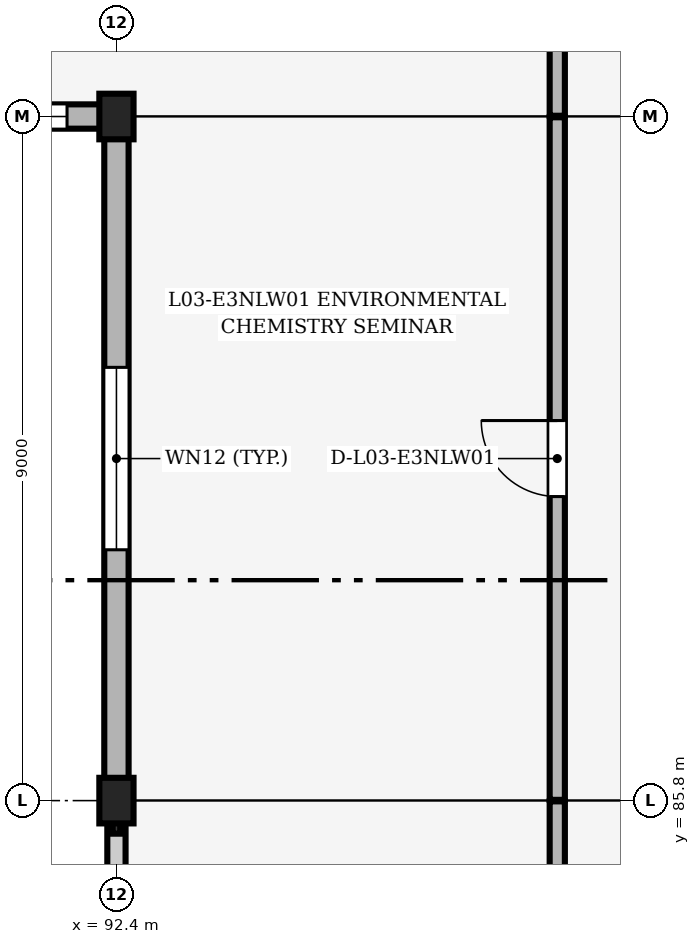
"""IFC4 building model, lengths in metres.
Left out: names, types, materials, properties, quantities, classifications, styles, units other than length and angle.
Written with IfcOpenShell. Run it as: python <this file> out.ifc"""

import sys

from ifc_helpers import new_model, si_unit, direction, frame, frame_2d, origin, origin_2d, place, context, subcontext, project, spatial, rectangle, extrude, element, fill, save


model = new_model("IFC4")
c1 = context("Model", 3, precision=1e-05, world=origin(), true_north=direction((0.0, 1.0)))
c2 = subcontext(c1, "Body", "Model", "MODEL_VIEW")
j1 = project(units=[si_unit("LENGTHUNIT", "METRE"), si_unit("PLANEANGLEUNIT", "RADIAN")], contexts=[c1])
p1 = place(None, origin())
s1 = spatial("IfcSite", under=j1, at=p1, CompositionType="ELEMENT")
p2 = place(p1, origin())
s2 = spatial("IfcBuilding", under=s1, at=p2, CompositionType="ELEMENT")
p3 = place(p2, frame((0.0, 0.0, 13.2)))
s3 = spatial("IfcBuildingStorey", under=s2, at=p3, CompositionType="ELEMENT", Elevation=13.2)
for number, where, z_axis, x_axis in (
    (1, (92.4, 85.8, 0.0), (0.0, 0.0, 1.0), (1.0, 0.0, 0.0)),
    (2, (92.4, 94.8, 0.0), (0.0, 0.0, 1.0), (1.0, 0.0, 0.0)),
):
    element("IfcColumn", number, at=place(p3, frame(where, z_axis=z_axis, x_axis=x_axis)), inside=s3, PredefinedType="COLUMN", context=c2, shape_type="SweptSolid", body=[
        extrude(rectangle(XDim=0.45, YDim=0.6, at=origin_2d()), origin(), (0.0, 0.0, 1.0), 4.2),
    ])
p4 = place(p3, frame((84.225, 94.8, 0.0), z_axis=(0.0, 0.0, 1.0), x_axis=(1.0, 0.0, 0.0)))
e3 = element("IfcWall", 3, at=p4, inside=s3, PredefinedType="SOLIDWALL", context=c2, shape_type="SweptSolid", body=[
    extrude(rectangle(XDim=7.975, YDim=0.32, at=frame_2d((3.987, 0.0))), origin(), (0.0, 0.0, 1.0), 3.48),
])
p5 = place(p4, frame((0.45, 0.0, 0.9)))
e4 = element("IfcOpeningElement", 4, at=p5, cuts=e3, PredefinedType="OPENING", context=c2, shape_type="SweptSolid", body=[
    extrude(rectangle(XDim=1.68, YDim=2.4, at=frame_2d((0.84, 1.2))), frame((0.0, 0.17, 0.0), z_axis=(0.0, -1.0, 0.0), x_axis=(1.0, 0.0, 0.0)), (0.0, 0.0, 1.0), 0.34),
])
p6 = place(p4, frame((6.325, 0.0, 0.9)))
e5 = element("IfcOpeningElement", 5, at=p6, cuts=e3, PredefinedType="OPENING", context=c2, shape_type="SweptSolid", body=[
    extrude(rectangle(XDim=1.2, YDim=1.5, at=frame_2d((0.6, 0.75))), frame((0.0, 0.17, 0.0), z_axis=(0.0, -1.0, 0.0), x_axis=(1.0, 0.0, 0.0)), (0.0, 0.0, 1.0), 0.34),
])
p7 = place(p3, frame((92.4, 86.075, 0.0), z_axis=(0.0, 0.0, 1.0), x_axis=(0.0, 1.0, 0.0)))
e6 = element("IfcWall", 6, at=p7, inside=s3, PredefinedType="SOLIDWALL", context=c2, shape_type="SweptSolid", body=[
    extrude(rectangle(XDim=8.45, YDim=0.32, at=frame_2d((4.225, 0.0))), origin(), (0.0, 0.0, 1.0), 3.48),
])
p8 = place(p7, frame((3.025, 0.0, 0.9)))
e7 = element("IfcOpeningElement", 7, at=p8, cuts=e6, PredefinedType="OPENING", context=c2, shape_type="SweptSolid", body=[
    extrude(rectangle(XDim=2.4, YDim=1.8, at=frame_2d((1.2, 0.9))), frame((0.0, 0.17, 0.0), z_axis=(0.0, -1.0, 0.0), x_axis=(1.0, 0.0, 0.0)), (0.0, 0.0, 1.0), 0.34),
])
p9 = place(p3, frame((92.4, 77.675, 0.0), z_axis=(0.0, 0.0, 1.0), x_axis=(0.0, 1.0, 0.0)))
e8 = element("IfcWall", 8, at=p9, inside=s3, PredefinedType="SOLIDWALL", context=c2, shape_type="SweptSolid", body=[
    extrude(rectangle(XDim=7.85, YDim=0.24, at=frame_2d((3.925, 0.0))), origin(), (0.0, 0.0, 1.0), 1.15),
])
p10 = place(p3, frame((98.2, 94.81, 0.0), z_axis=(0.0, 0.0, 1.0), x_axis=(0.0, 1.0, 0.0)))
e9 = element("IfcWall", 9, at=p10, inside=s3, PredefinedType="PARTITIONING", context=c2, shape_type="SweptSolid", body=[
    extrude(rectangle(XDim=6.085, YDim=0.2, at=frame_2d((3.042, 0.0))), origin(), (0.0, 0.0, 1.0), 3.9),
])
p11 = place(p3, frame((98.2, 85.81, 0.0), z_axis=(0.0, 0.0, 1.0), x_axis=(0.0, 1.0, 0.0)))
e10 = element("IfcWall", 10, at=p11, inside=s3, PredefinedType="PARTITIONING", context=c2, shape_type="SweptSolid", body=[
    extrude(rectangle(XDim=8.98, YDim=0.2, at=frame_2d((4.49, 0.0))), origin(), (0.0, 0.0, 1.0), 3.9),
])
p12 = place(p11, frame((3.99, 0.0, 0.0)))
e11 = element("IfcOpeningElement", 11, at=p12, cuts=e10, PredefinedType="OPENING", context=c2, shape_type="SweptSolid", body=[
    extrude(rectangle(XDim=1.0, YDim=2.15, at=frame_2d((0.5, 1.075))), frame((0.0, 0.11, 0.0), z_axis=(0.0, -1.0, 0.0), x_axis=(1.0, 0.0, 0.0)), (0.0, 0.0, 1.0), 0.22),
])
p13 = place(p3, frame((98.2, 35.565, 0.0), z_axis=(0.0, 0.0, 1.0), x_axis=(0.0, 1.0, 0.0)))
e12 = element("IfcWall", 12, at=p13, inside=s3, PredefinedType="PARTITIONING", context=c2, shape_type="SweptSolid", body=[
    extrude(rectangle(XDim=50.225, YDim=0.2, at=frame_2d((25.113, 0.0))), origin(), (0.0, 0.0, 1.0), 3.9),
])
p14 = place(p13, frame((5.035, 0.0, 0.0)))
e13 = element("IfcOpeningElement", 13, at=p14, cuts=e12, PredefinedType="OPENING", context=c2, shape_type="SweptSolid", body=[
    extrude(rectangle(XDim=1.0, YDim=2.15, at=frame_2d((0.5, 1.075))), frame((0.0, 0.11, 0.0), z_axis=(0.0, -1.0, 0.0), x_axis=(1.0, 0.0, 0.0)), (0.0, 0.0, 1.0), 0.22),
])
p15 = place(p13, frame((13.56, 0.0, 0.0)))
e14 = element("IfcOpeningElement", 14, at=p15, cuts=e12, PredefinedType="OPENING", context=c2, shape_type="SweptSolid", body=[
    extrude(rectangle(XDim=0.95, YDim=2.2, at=frame_2d((0.475, 1.1))), frame((0.0, 0.11, 0.0), z_axis=(0.0, -1.0, 0.0), x_axis=(1.0, 0.0, 0.0)), (0.0, 0.0, 1.0), 0.22),
])
p16 = place(p13, frame((19.16, 0.0, 0.0)))
e15 = element("IfcOpeningElement", 15, at=p16, cuts=e12, PredefinedType="OPENING", context=c2, shape_type="SweptSolid", body=[
    extrude(rectangle(XDim=0.95, YDim=2.2, at=frame_2d((0.475, 1.1))), frame((0.0, 0.11, 0.0), z_axis=(0.0, -1.0, 0.0), x_axis=(1.0, 0.0, 0.0)), (0.0, 0.0, 1.0), 0.22),
])
p17 = place(p13, frame((24.76, 0.0, 0.0)))
e16 = element("IfcOpeningElement", 16, at=p17, cuts=e12, PredefinedType="OPENING", context=c2, shape_type="SweptSolid", body=[
    extrude(rectangle(XDim=0.95, YDim=2.1, at=frame_2d((0.475, 1.05))), frame((0.0, 0.11, 0.0), z_axis=(0.0, -1.0, 0.0), x_axis=(1.0, 0.0, 0.0)), (0.0, 0.0, 1.0), 0.22),
])
p18 = place(p13, frame((33.035, 0.0, 0.0)))
e17 = element("IfcOpeningElement", 17, at=p18, cuts=e12, PredefinedType="OPENING", context=c2, shape_type="SweptSolid", body=[
    extrude(rectangle(XDim=1.0, YDim=2.15, at=frame_2d((0.5, 1.075))), frame((0.0, 0.11, 0.0), z_axis=(0.0, -1.0, 0.0), x_axis=(1.0, 0.0, 0.0)), (0.0, 0.0, 1.0), 0.22),
])
p19 = place(p13, frame((44.135, 0.0, 0.0)))
e18 = element("IfcOpeningElement", 18, at=p19, cuts=e12, PredefinedType="OPENING", context=c2, shape_type="SweptSolid", body=[
    extrude(rectangle(XDim=1.0, YDim=2.15, at=frame_2d((0.5, 1.075))), frame((0.0, 0.11, 0.0), z_axis=(0.0, -1.0, 0.0), x_axis=(1.0, 0.0, 0.0)), (0.0, 0.0, 1.0), 0.22),
])
p20 = place(p6, origin())
e19 = element("IfcWindow", 19, at=p20, inside=s3, PartitioningType="SINGLE_PANEL", PredefinedType="WINDOW", context=c2, shape_type="SweptSolid", body=[
    extrude(rectangle(XDim=1.2, YDim=1.5, at=frame_2d((0.6, 0.75))), frame((0.0, 0.03, 0.0), z_axis=(0.0, -1.0, 0.0), x_axis=(1.0, 0.0, 0.0)), (0.0, 0.0, 1.0), 0.06),
])
fill(e5, e19)
p21 = place(p8, origin())
e20 = element("IfcWindow", 20, at=p21, inside=s3, PartitioningType="SINGLE_PANEL", PredefinedType="WINDOW", context=c2, shape_type="SweptSolid", body=[
    extrude(rectangle(XDim=2.4, YDim=1.8, at=frame_2d((1.2, 0.9))), frame((0.0, 0.03, 0.0), z_axis=(0.0, -1.0, 0.0), x_axis=(1.0, 0.0, 0.0)), (0.0, 0.0, 1.0), 0.06),
])
fill(e7, e20)
p22 = place(p12, origin())
e21 = element("IfcDoor", 21, at=p22, inside=s3, OperationType="SINGLE_SWING_RIGHT", PredefinedType="DOOR", context=c2, shape_type="SweptSolid", body=[
    extrude(rectangle(XDim=1.0, YDim=2.15, at=frame_2d((0.5, 1.075))), frame((0.0, 0.025, 0.0), z_axis=(0.0, -1.0, 0.0), x_axis=(1.0, 0.0, 0.0)), (0.0, 0.0, 1.0), 0.05),
])
fill(e11, e21)
save(model, sys.argv[1])
